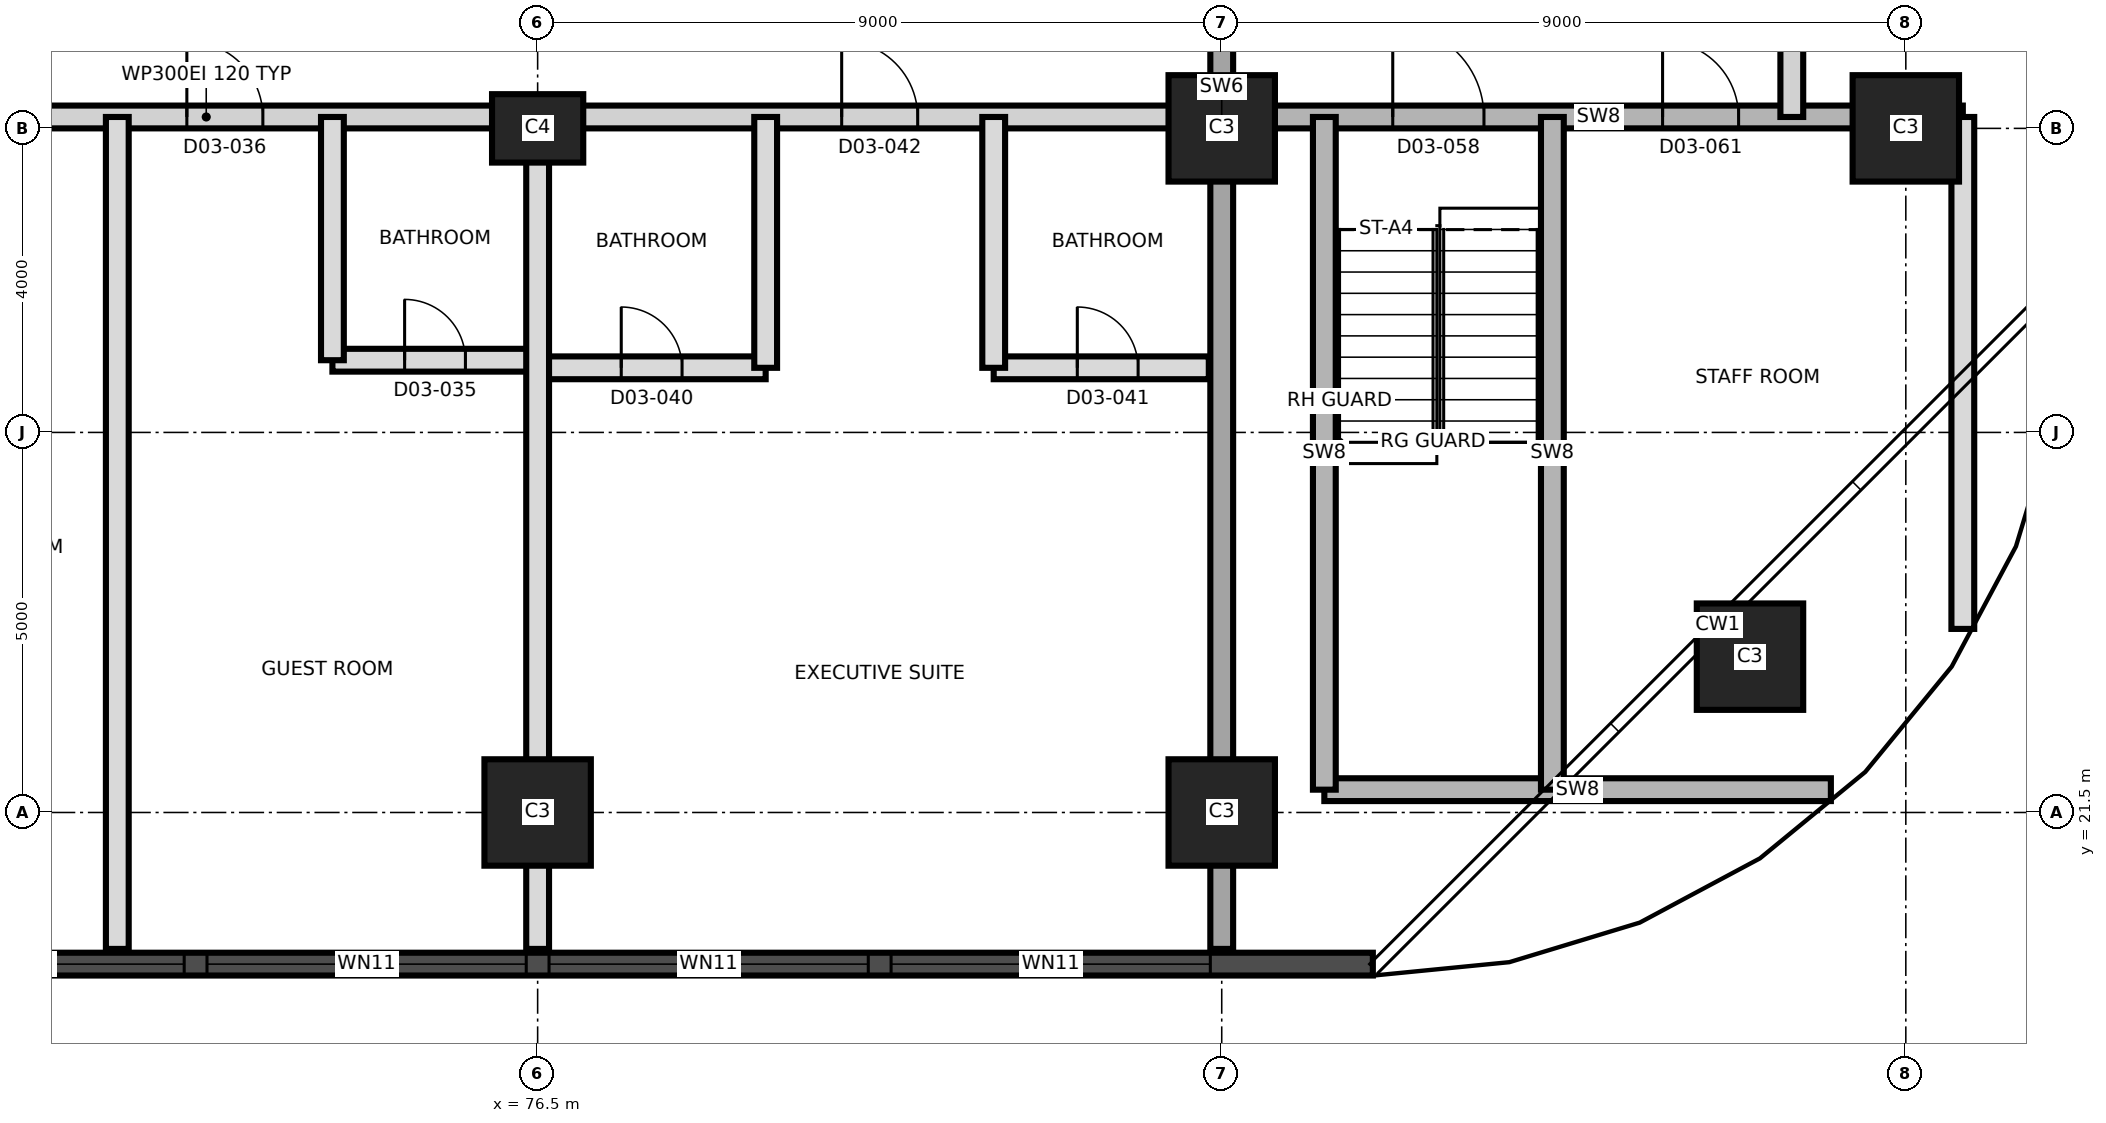
"""IFC4 building model, lengths in metres.
Left out: names, types, materials, properties, quantities, classifications, styles, units other than length and angle.
Written with IfcOpenShell. Run it as: python <this file> out.ifc"""

import sys

from ifc_helpers import new_model, si_unit, direction, frame, frame_2d, origin, origin_2d, place, context, subcontext, project, spatial, rectangle, extrude, element, fill, save


model = new_model("IFC4")
c1 = context("Model", 3, precision=1e-05, world=origin(), true_north=direction((0.0, 1.0)))
c2 = subcontext(c1, "Body", "Model", "MODEL_VIEW")
j1 = project(units=[si_unit("LENGTHUNIT", "METRE"), si_unit("PLANEANGLEUNIT", "RADIAN")], contexts=[c1])
p1 = place(None, origin())
s1 = spatial("IfcSite", under=j1, at=p1, CompositionType="ELEMENT")
p2 = place(p1, origin())
s2 = spatial("IfcBuilding", under=s1, at=p2, CompositionType="ELEMENT")
p3 = place(p2, frame((0.0, 0.0, 55.7)))
s3 = spatial("IfcBuildingStorey", under=s2, at=p3, CompositionType="ELEMENT", Elevation=55.7)
for number, where, z_axis, x_axis in (
    (1, (76.5, 21.5, 0.0), (0.0, 0.0, 1.0), (1.0, 0.0, 0.0)),
    (2, (85.5, 21.5, 0.0), (0.0, 0.0, 1.0), (1.0, 0.0, 0.0)),
    (3, (92.45, 23.55, 0.0), (0.0, 0.0, 1.0), (1.0, 0.0, 0.0)),
):
    element("IfcColumn", number, at=place(p3, frame(where, z_axis=z_axis, x_axis=x_axis)), inside=s3, PredefinedType="COLUMN", context=c2, shape_type="SweptSolid", body=[
        extrude(rectangle(XDim=1.4, YDim=1.4, at=origin_2d()), origin(), (0.0, 0.0, 1.0), 3.7),
    ])
p4 = place(p3, frame((76.5, 30.5, 0.0), z_axis=(0.0, 0.0, 1.0), x_axis=(1.0, 0.0, 0.0)))
e4 = element("IfcColumn", 4, at=p4, inside=s3, PredefinedType="COLUMN", context=c2, shape_type="SweptSolid", body=[
    extrude(rectangle(XDim=1.2, YDim=0.9, at=origin_2d()), origin(), (0.0, 0.0, 1.0), 3.7),
])
for number, where, z_axis, x_axis in (
    (5, (85.5, 30.5, 0.0), (0.0, 0.0, 1.0), (1.0, 0.0, 0.0)),
    (6, (94.5, 30.5, 0.0), (0.0, 0.0, 1.0), (1.0, 0.0, 0.0)),
):
    element("IfcColumn", number, at=place(p3, frame(where, z_axis=z_axis, x_axis=x_axis)), inside=s3, PredefinedType="COLUMN", context=c2, shape_type="SweptSolid", body=[
        extrude(rectangle(XDim=1.4, YDim=1.4, at=origin_2d()), origin(), (0.0, 0.0, 1.0), 3.7),
    ])
p5 = place(p3, frame((85.5, 19.705, 0.0), z_axis=(0.0, 0.0, 1.0), x_axis=(0.0, 1.0, 0.0)))
e7 = element("IfcWall", 7, at=p5, inside=s3, PredefinedType="SHEAR", context=c2, shape_type="SweptSolid", body=[
    extrude(rectangle(XDim=21.59, YDim=0.3, at=frame_2d((10.795, 0.0))), origin(), (0.0, 0.0, 1.0), 3.7),
])
p6 = place(p5, frame((11.995, 0.0, 0.0)))
e8 = element("IfcOpeningElement", 8, at=p6, cuts=e7, PredefinedType="OPENING", context=c2, shape_type="SweptSolid", body=[
    extrude(rectangle(XDim=1.4, YDim=2.1, at=frame_2d((0.7, 1.05))), frame((0.0, 0.16, 0.0), z_axis=(0.0, -1.0, 0.0), x_axis=(1.0, 0.0, 0.0)), (0.0, 0.0, 1.0), 0.32),
])
p7 = place(p3, frame((44.01, 19.505, 0.0), z_axis=(0.0, 0.0, 1.0), x_axis=(1.0, 0.0, 0.0)))
e9 = element("IfcWall", 9, at=p7, inside=s3, PredefinedType="SOLIDWALL", context=c2, shape_type="SweptSolid", body=[
    extrude(rectangle(XDim=43.478, YDim=0.3, at=frame_2d((21.739, 0.0))), origin(), (0.0, 0.0, 1.0), 3.4),
])
p8 = place(p7, frame((1.845, 0.0, 0.3)))
e10 = element("IfcOpeningElement", 10, at=p8, cuts=e9, PredefinedType="OPENING", context=c2, shape_type="SweptSolid", body=[
    extrude(rectangle(XDim=1.8, YDim=2.4, at=frame_2d((0.9, 1.2))), frame((0.0, 0.16, 0.0), z_axis=(0.0, -1.0, 0.0), x_axis=(1.0, 0.0, 0.0)), (0.0, 0.0, 1.0), 0.32),
])
p9 = place(p7, frame((5.64, 0.0, 0.9)))
e11 = element("IfcOpeningElement", 11, at=p9, cuts=e9, PredefinedType="OPENING", context=c2, shape_type="SweptSolid", body=[
    extrude(rectangle(XDim=4.2, YDim=1.5, at=frame_2d((2.1, 0.75))), frame((0.0, 0.16, 0.0), z_axis=(0.0, -1.0, 0.0), x_axis=(1.0, 0.0, 0.0)), (0.0, 0.0, 1.0), 0.32),
])
p10 = place(p7, frame((10.14, 0.0, 0.9)))
e12 = element("IfcOpeningElement", 12, at=p10, cuts=e9, PredefinedType="OPENING", context=c2, shape_type="SweptSolid", body=[
    extrude(rectangle(XDim=4.2, YDim=1.5, at=frame_2d((2.1, 0.75))), frame((0.0, 0.16, 0.0), z_axis=(0.0, -1.0, 0.0), x_axis=(1.0, 0.0, 0.0)), (0.0, 0.0, 1.0), 0.32),
])
p11 = place(p7, frame((14.64, 0.0, 0.9)))
e13 = element("IfcOpeningElement", 13, at=p11, cuts=e9, PredefinedType="OPENING", context=c2, shape_type="SweptSolid", body=[
    extrude(rectangle(XDim=4.2, YDim=1.5, at=frame_2d((2.1, 0.75))), frame((0.0, 0.16, 0.0), z_axis=(0.0, -1.0, 0.0), x_axis=(1.0, 0.0, 0.0)), (0.0, 0.0, 1.0), 0.32),
])
p12 = place(p7, frame((19.14, 0.0, 0.9)))
e14 = element("IfcOpeningElement", 14, at=p12, cuts=e9, PredefinedType="OPENING", context=c2, shape_type="SweptSolid", body=[
    extrude(rectangle(XDim=4.2, YDim=1.5, at=frame_2d((2.1, 0.75))), frame((0.0, 0.16, 0.0), z_axis=(0.0, -1.0, 0.0), x_axis=(1.0, 0.0, 0.0)), (0.0, 0.0, 1.0), 0.32),
])
p13 = place(p7, frame((23.64, 0.0, 0.9)))
e15 = element("IfcOpeningElement", 15, at=p13, cuts=e9, PredefinedType="OPENING", context=c2, shape_type="SweptSolid", body=[
    extrude(rectangle(XDim=4.2, YDim=1.5, at=frame_2d((2.1, 0.75))), frame((0.0, 0.16, 0.0), z_axis=(0.0, -1.0, 0.0), x_axis=(1.0, 0.0, 0.0)), (0.0, 0.0, 1.0), 0.32),
])
p14 = place(p7, frame((28.14, 0.0, 0.9)))
e16 = element("IfcOpeningElement", 16, at=p14, cuts=e9, PredefinedType="OPENING", context=c2, shape_type="SweptSolid", body=[
    extrude(rectangle(XDim=4.2, YDim=1.5, at=frame_2d((2.1, 0.75))), frame((0.0, 0.16, 0.0), z_axis=(0.0, -1.0, 0.0), x_axis=(1.0, 0.0, 0.0)), (0.0, 0.0, 1.0), 0.32),
])
p15 = place(p7, frame((32.64, 0.0, 0.9)))
e17 = element("IfcOpeningElement", 17, at=p15, cuts=e9, PredefinedType="OPENING", context=c2, shape_type="SweptSolid", body=[
    extrude(rectangle(XDim=4.2, YDim=1.5, at=frame_2d((2.1, 0.75))), frame((0.0, 0.16, 0.0), z_axis=(0.0, -1.0, 0.0), x_axis=(1.0, 0.0, 0.0)), (0.0, 0.0, 1.0), 0.32),
])
p16 = place(p7, frame((37.14, 0.0, 0.9)))
e18 = element("IfcOpeningElement", 18, at=p16, cuts=e9, PredefinedType="OPENING", context=c2, shape_type="SweptSolid", body=[
    extrude(rectangle(XDim=4.2, YDim=1.5, at=frame_2d((2.1, 0.75))), frame((0.0, 0.16, 0.0), z_axis=(0.0, -1.0, 0.0), x_axis=(1.0, 0.0, 0.0)), (0.0, 0.0, 1.0), 0.32),
])
p17 = place(p3, frame((86.85, 21.8, 0.0), z_axis=(0.0, 0.0, 1.0), x_axis=(1.0, 0.0, 0.0)))
e19 = element("IfcWall", 19, at=p17, inside=s3, PredefinedType="SHEAR", context=c2, shape_type="SweptSolid", body=[
    extrude(rectangle(XDim=6.664, YDim=0.3, at=frame_2d((3.332, 0.0))), origin(), (0.0, 0.0, 1.0), 3.4),
])
p18 = place(p3, frame((76.5, 27.35, 0.0), z_axis=(0.0, 0.0, 1.0), x_axis=(1.0, 0.0, 0.0)))
e20 = element("IfcWall", 20, at=p18, inside=s3, PredefinedType="PARTITIONING", context=c2, shape_type="SweptSolid", body=[
    extrude(rectangle(XDim=3.0, YDim=0.3, at=frame_2d((1.5, 0.0))), origin(), (0.0, 0.0, 1.0), 3.4),
])
p19 = place(p18, frame((1.1, 0.0, 0.0)))
e21 = element("IfcOpeningElement", 21, at=p19, cuts=e20, PredefinedType="OPENING", context=c2, shape_type="SweptSolid", body=[
    extrude(rectangle(XDim=0.8, YDim=2.1, at=frame_2d((0.4, 1.05))), frame((0.0, 0.16, 0.0), z_axis=(0.0, -1.0, 0.0), x_axis=(1.0, 0.0, 0.0)), (0.0, 0.0, 1.0), 0.32),
])
p20 = place(p3, frame((82.5, 27.35, 0.0), z_axis=(0.0, 0.0, 1.0), x_axis=(1.0, 0.0, 0.0)))
e22 = element("IfcWall", 22, at=p20, inside=s3, PredefinedType="PARTITIONING", context=c2, shape_type="SweptSolid", body=[
    extrude(rectangle(XDim=2.83, YDim=0.3, at=frame_2d((1.415, 0.0))), origin(), (0.0, 0.0, 1.0), 3.4),
])
p21 = place(p20, frame((1.1, 0.0, 0.0)))
e23 = element("IfcOpeningElement", 23, at=p21, cuts=e22, PredefinedType="OPENING", context=c2, shape_type="SweptSolid", body=[
    extrude(rectangle(XDim=0.8, YDim=2.1, at=frame_2d((0.4, 1.05))), frame((0.0, 0.16, 0.0), z_axis=(0.0, -1.0, 0.0), x_axis=(1.0, 0.0, 0.0)), (0.0, 0.0, 1.0), 0.32),
])
p22 = place(p3, frame((73.8, 27.45, 0.0), z_axis=(0.0, 0.0, 1.0), x_axis=(1.0, 0.0, 0.0)))
e24 = element("IfcWall", 24, at=p22, inside=s3, PredefinedType="PARTITIONING", context=c2, shape_type="SweptSolid", body=[
    extrude(rectangle(XDim=2.7, YDim=0.3, at=frame_2d((1.35, 0.0))), origin(), (0.0, 0.0, 1.0), 3.4),
])
p23 = place(p22, frame((0.95, 0.0, 0.0)))
e25 = element("IfcOpeningElement", 25, at=p23, cuts=e24, PredefinedType="OPENING", context=c2, shape_type="SweptSolid", body=[
    extrude(rectangle(XDim=0.8, YDim=2.1, at=frame_2d((0.4, 1.05))), frame((0.0, 0.16, 0.0), z_axis=(0.0, -1.0, 0.0), x_axis=(1.0, 0.0, 0.0)), (0.0, 0.0, 1.0), 0.32),
])
p24 = place(p3, frame((58.95, 30.65, 0.0), z_axis=(0.0, 0.0, 1.0), x_axis=(1.0, 0.0, 0.0)))
e26 = element("IfcWall", 26, at=p24, inside=s3, PredefinedType="PARTITIONING", context=c2, shape_type="SweptSolid", body=[
    extrude(rectangle(XDim=26.38, YDim=0.3, at=frame_2d((13.19, 0.0))), origin(), (0.0, 0.0, 1.0), 3.4),
])
p25 = place(p24, frame((0.685, 0.0, 0.0)))
e27 = element("IfcOpeningElement", 27, at=p25, cuts=e26, PredefinedType="OPENING", context=c2, shape_type="SweptSolid", body=[
    extrude(rectangle(XDim=1.2, YDim=2.1, at=frame_2d((0.6, 1.05))), frame((0.0, 0.16, 0.0), z_axis=(0.0, -1.0, 0.0), x_axis=(1.0, 0.0, 0.0)), (0.0, 0.0, 1.0), 0.32),
])
p26 = place(p24, frame((3.935, 0.0, 0.0)))
e28 = element("IfcOpeningElement", 28, at=p26, cuts=e26, PredefinedType="OPENING", context=c2, shape_type="SweptSolid", body=[
    extrude(rectangle(XDim=1.0, YDim=2.1, at=frame_2d((0.5, 1.05))), frame((0.0, 0.16, 0.0), z_axis=(0.0, -1.0, 0.0), x_axis=(1.0, 0.0, 0.0)), (0.0, 0.0, 1.0), 0.32),
])
p27 = place(p24, frame((9.685, 0.0, 0.0)))
e29 = element("IfcOpeningElement", 29, at=p27, cuts=e26, PredefinedType="OPENING", context=c2, shape_type="SweptSolid", body=[
    extrude(rectangle(XDim=1.2, YDim=2.1, at=frame_2d((0.6, 1.05))), frame((0.0, 0.16, 0.0), z_axis=(0.0, -1.0, 0.0), x_axis=(1.0, 0.0, 0.0)), (0.0, 0.0, 1.0), 0.32),
])
p28 = place(p24, frame((12.935, 0.0, 0.0)))
e30 = element("IfcOpeningElement", 30, at=p28, cuts=e26, PredefinedType="OPENING", context=c2, shape_type="SweptSolid", body=[
    extrude(rectangle(XDim=1.0, YDim=2.1, at=frame_2d((0.5, 1.05))), frame((0.0, 0.16, 0.0), z_axis=(0.0, -1.0, 0.0), x_axis=(1.0, 0.0, 0.0)), (0.0, 0.0, 1.0), 0.32),
])
p29 = place(p24, frame((21.55, 0.0, 0.0)))
e31 = element("IfcOpeningElement", 31, at=p29, cuts=e26, PredefinedType="OPENING", context=c2, shape_type="SweptSolid", body=[
    extrude(rectangle(XDim=1.0, YDim=2.4, at=frame_2d((0.5, 1.2))), frame((0.0, 0.16, 0.0), z_axis=(0.0, -1.0, 0.0), x_axis=(1.0, 0.0, 0.0)), (0.0, 0.0, 1.0), 0.32),
])
p30 = place(p3, frame((85.67, 30.65, 0.0), z_axis=(0.0, 0.0, 1.0), x_axis=(1.0, 0.0, 0.0)))
e32 = element("IfcWall", 32, at=p30, inside=s3, PredefinedType="SHEAR", context=c2, shape_type="SweptSolid", body=[
    extrude(rectangle(XDim=9.58, YDim=0.3, at=frame_2d((4.79, 0.0))), origin(), (0.0, 0.0, 1.0), 3.4),
])
p31 = place(p30, frame((2.08, 0.0, 0.0)))
e33 = element("IfcOpeningElement", 33, at=p31, cuts=e32, PredefinedType="OPENING", context=c2, shape_type="SweptSolid", body=[
    extrude(rectangle(XDim=1.2, YDim=2.1, at=frame_2d((0.6, 1.05))), frame((0.0, 0.16, 0.0), z_axis=(0.0, -1.0, 0.0), x_axis=(1.0, 0.0, 0.0)), (0.0, 0.0, 1.0), 0.32),
])
p32 = place(p30, frame((5.63, 0.0, 0.0)))
e34 = element("IfcOpeningElement", 34, at=p32, cuts=e32, PredefinedType="OPENING", context=c2, shape_type="SweptSolid", body=[
    extrude(rectangle(XDim=1.0, YDim=2.1, at=frame_2d((0.5, 1.05))), frame((0.0, 0.16, 0.0), z_axis=(0.0, -1.0, 0.0), x_axis=(1.0, 0.0, 0.0)), (0.0, 0.0, 1.0), 0.32),
])
p33 = place(p3, frame((70.97, 19.705, 0.0), z_axis=(0.0, 0.0, 1.0), x_axis=(0.0, 1.0, 0.0)))
e35 = element("IfcWall", 35, at=p33, inside=s3, PredefinedType="PARTITIONING", context=c2, shape_type="SweptSolid", body=[
    extrude(rectangle(XDim=10.945, YDim=0.3, at=frame_2d((5.472, 0.0))), origin(), (0.0, 0.0, 1.0), 3.4),
])
p34 = place(p3, frame((73.8, 27.45, 0.0), z_axis=(0.0, 0.0, 1.0), x_axis=(0.0, 1.0, 0.0)))
e36 = element("IfcWall", 36, at=p34, inside=s3, PredefinedType="PARTITIONING", context=c2, shape_type="SweptSolid", body=[
    extrude(rectangle(XDim=3.2, YDim=0.3, at=frame_2d((1.6, 0.0))), origin(), (0.0, 0.0, 1.0), 3.4),
])
p35 = place(p3, frame((76.5, 19.705, 0.0), z_axis=(0.0, 0.0, 1.0), x_axis=(0.0, 1.0, 0.0)))
e37 = element("IfcWall", 37, at=p35, inside=s3, PredefinedType="PARTITIONING", context=c2, shape_type="SweptSolid", body=[
    extrude(rectangle(XDim=10.945, YDim=0.3, at=frame_2d((5.472, 0.0))), origin(), (0.0, 0.0, 1.0), 3.4),
])
for number, where, z_axis, x_axis in (
    (38, (79.5, 27.35, 0.0), (0.0, 0.0, 1.0), (0.0, 1.0, 0.0)),
    (39, (82.5, 27.35, 0.0), (0.0, 0.0, 1.0), (0.0, 1.0, 0.0)),
):
    element("IfcWall", number, at=place(p3, frame(where, z_axis=z_axis, x_axis=x_axis)), inside=s3, PredefinedType="PARTITIONING", context=c2, shape_type="SweptSolid", body=[
        extrude(rectangle(XDim=3.3, YDim=0.3, at=frame_2d((1.65, 0.0))), origin(), (0.0, 0.0, 1.0), 3.4),
    ])
for number, where, z_axis, x_axis in (
    (40, (86.85, 21.8, 0.0), (0.0, 0.0, 1.0), (0.0, 1.0, 0.0)),
    (41, (89.85, 21.8, 0.0), (0.0, 0.0, 1.0), (0.0, 1.0, 0.0)),
):
    element("IfcWall", number, at=place(p3, frame(where, z_axis=z_axis, x_axis=x_axis)), inside=s3, PredefinedType="SHEAR", context=c2, shape_type="SweptSolid", body=[
        extrude(rectangle(XDim=8.85, YDim=0.3, at=frame_2d((4.425, 0.0))), origin(), (0.0, 0.0, 1.0), 3.4),
    ])
p36 = place(p3, frame((93.0, 30.65, 0.0), z_axis=(0.0, 0.0, 1.0), x_axis=(0.0, 1.0, 0.0)))
e42 = element("IfcWall", 42, at=p36, inside=s3, PredefinedType="PARTITIONING", context=c2, shape_type="SweptSolid", body=[
    extrude(rectangle(XDim=2.7, YDim=0.3, at=frame_2d((1.35, 0.0))), origin(), (0.0, 0.0, 1.0), 3.4),
])
p37 = place(p3, frame((95.25, 23.915, 0.0), z_axis=(0.0, 0.0, 1.0), x_axis=(0.0, 1.0, 0.0)))
e43 = element("IfcWall", 43, at=p37, inside=s3, PredefinedType="PARTITIONING", context=c2, shape_type="SweptSolid", body=[
    extrude(rectangle(XDim=6.735, YDim=0.3, at=frame_2d((3.367, 0.0))), origin(), (0.0, 0.0, 1.0), 3.4),
])
p38 = place(p13, origin())
e44 = element("IfcWindow", 44, at=p38, inside=s3, PartitioningType="SINGLE_PANEL", PredefinedType="WINDOW", context=c2, shape_type="SweptSolid", body=[
    extrude(rectangle(XDim=4.2, YDim=1.5, at=frame_2d((2.1, 0.75))), frame((0.0, 0.03, 0.0), z_axis=(0.0, -1.0, 0.0), x_axis=(1.0, 0.0, 0.0)), (0.0, 0.0, 1.0), 0.06),
])
fill(e15, e44)
p39 = place(p14, origin())
e45 = element("IfcWindow", 45, at=p39, inside=s3, PartitioningType="SINGLE_PANEL", PredefinedType="WINDOW", context=c2, shape_type="SweptSolid", body=[
    extrude(rectangle(XDim=4.2, YDim=1.5, at=frame_2d((2.1, 0.75))), frame((0.0, 0.03, 0.0), z_axis=(0.0, -1.0, 0.0), x_axis=(1.0, 0.0, 0.0)), (0.0, 0.0, 1.0), 0.06),
])
fill(e16, e45)
p40 = place(p15, origin())
e46 = element("IfcWindow", 46, at=p40, inside=s3, PartitioningType="SINGLE_PANEL", PredefinedType="WINDOW", context=c2, shape_type="SweptSolid", body=[
    extrude(rectangle(XDim=4.2, YDim=1.5, at=frame_2d((2.1, 0.75))), frame((0.0, 0.03, 0.0), z_axis=(0.0, -1.0, 0.0), x_axis=(1.0, 0.0, 0.0)), (0.0, 0.0, 1.0), 0.06),
])
fill(e17, e46)
p41 = place(p16, origin())
e47 = element("IfcWindow", 47, at=p41, inside=s3, PartitioningType="SINGLE_PANEL", PredefinedType="WINDOW", context=c2, shape_type="SweptSolid", body=[
    extrude(rectangle(XDim=4.2, YDim=1.5, at=frame_2d((2.1, 0.75))), frame((0.0, 0.03, 0.0), z_axis=(0.0, -1.0, 0.0), x_axis=(1.0, 0.0, 0.0)), (0.0, 0.0, 1.0), 0.06),
])
fill(e18, e47)
p42 = place(p23, origin())
e48 = element("IfcDoor", 48, at=p42, inside=s3, OperationType="SINGLE_SWING_LEFT", PredefinedType="DOOR", context=c2, shape_type="SweptSolid", body=[
    extrude(rectangle(XDim=0.8, YDim=2.1, at=frame_2d((0.4, 1.05))), frame((0.0, 0.025, 0.0), z_axis=(0.0, -1.0, 0.0), x_axis=(1.0, 0.0, 0.0)), (0.0, 0.0, 1.0), 0.05),
])
fill(e25, e48)
p43 = place(p28, origin())
e49 = element("IfcDoor", 49, at=p43, inside=s3, OperationType="SINGLE_SWING_LEFT", PredefinedType="DOOR", context=c2, shape_type="SweptSolid", body=[
    extrude(rectangle(XDim=1.0, YDim=2.1, at=frame_2d((0.5, 1.05))), frame((0.0, 0.025, 0.0), z_axis=(0.0, -1.0, 0.0), x_axis=(1.0, 0.0, 0.0)), (0.0, 0.0, 1.0), 0.05),
])
fill(e30, e49)
p44 = place(p19, origin())
e50 = element("IfcDoor", 50, at=p44, inside=s3, OperationType="SINGLE_SWING_LEFT", PredefinedType="DOOR", context=c2, shape_type="SweptSolid", body=[
    extrude(rectangle(XDim=0.8, YDim=2.1, at=frame_2d((0.4, 1.05))), frame((0.0, 0.025, 0.0), z_axis=(0.0, -1.0, 0.0), x_axis=(1.0, 0.0, 0.0)), (0.0, 0.0, 1.0), 0.05),
])
fill(e21, e50)
p45 = place(p21, origin())
e51 = element("IfcDoor", 51, at=p45, inside=s3, OperationType="SINGLE_SWING_LEFT", PredefinedType="DOOR", context=c2, shape_type="SweptSolid", body=[
    extrude(rectangle(XDim=0.8, YDim=2.1, at=frame_2d((0.4, 1.05))), frame((0.0, 0.025, 0.0), z_axis=(0.0, -1.0, 0.0), x_axis=(1.0, 0.0, 0.0)), (0.0, 0.0, 1.0), 0.05),
])
fill(e23, e51)
p46 = place(p29, origin())
e52 = element("IfcDoor", 52, at=p46, inside=s3, OperationType="SINGLE_SWING_RIGHT", PredefinedType="DOOR", context=c2, shape_type="SweptSolid", body=[
    extrude(rectangle(XDim=1.0, YDim=2.4, at=frame_2d((0.5, 1.2))), frame((0.0, 0.025, 0.0), z_axis=(0.0, -1.0, 0.0), x_axis=(1.0, 0.0, 0.0)), (0.0, 0.0, 1.0), 0.05),
])
fill(e31, e52)
p47 = place(p31, origin())
e53 = element("IfcDoor", 53, at=p47, inside=s3, OperationType="SINGLE_SWING_LEFT", PredefinedType="DOOR", context=c2, shape_type="SweptSolid", body=[
    extrude(rectangle(XDim=1.2, YDim=2.1, at=frame_2d((0.6, 1.05))), frame((0.0, 0.025, 0.0), z_axis=(0.0, -1.0, 0.0), x_axis=(1.0, 0.0, 0.0)), (0.0, 0.0, 1.0), 0.05),
])
fill(e33, e53)
p48 = place(p32, origin())
e54 = element("IfcDoor", 54, at=p48, inside=s3, OperationType="SINGLE_SWING_LEFT", PredefinedType="DOOR", context=c2, shape_type="SweptSolid", body=[
    extrude(rectangle(XDim=1.0, YDim=2.1, at=frame_2d((0.5, 1.05))), frame((0.0, 0.025, 0.0), z_axis=(0.0, -1.0, 0.0), x_axis=(1.0, 0.0, 0.0)), (0.0, 0.0, 1.0), 0.05),
])
fill(e34, e54)
save(model, sys.argv[1])
